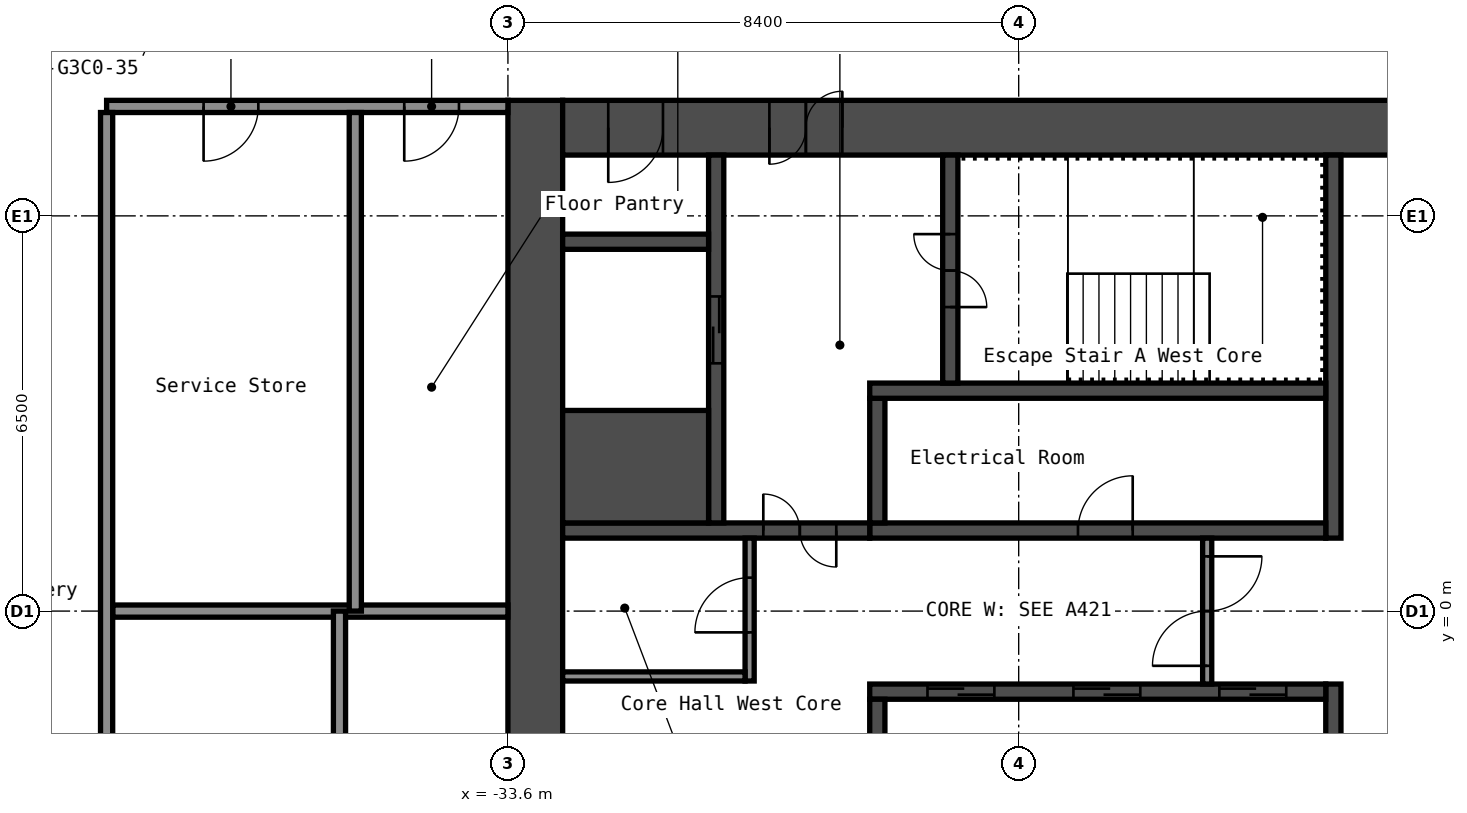
"""IFC4 building model, lengths in metres.
Left out: names, types, materials, properties, quantities, classifications, styles, units other than length and angle.
Written with IfcOpenShell. Run it as: python <this file> out.ifc"""

import sys

from ifc_helpers import new_model, si_unit, direction, frame, frame_2d, origin, place, context, subcontext, project, spatial, rectangle, extrude, element, fill, save


model = new_model("IFC4")
c1 = context("Model", 3, precision=1e-05, world=origin(), true_north=direction((0.0, 1.0)))
c2 = subcontext(c1, "Body", "Model", "MODEL_VIEW")
j1 = project(units=[si_unit("LENGTHUNIT", "METRE"), si_unit("PLANEANGLEUNIT", "RADIAN")], contexts=[c1])
p1 = place(None, origin())
s1 = spatial("IfcSite", under=j1, at=p1, CompositionType="ELEMENT")
p2 = place(p1, origin())
s2 = spatial("IfcBuilding", under=s1, at=p2, CompositionType="ELEMENT")
p3 = place(p2, frame((0.0, 0.0, 137.4)))
s3 = spatial("IfcBuildingStorey", under=s2, at=p3, CompositionType="ELEMENT", Elevation=137.4)
p4 = place(p3, frame((-33.15, -8.4, 0.0), z_axis=(0.0, 0.0, 1.0), x_axis=(0.0, 1.0, 0.0)))
e1 = element("IfcWall", 1, at=p4, inside=s3, PredefinedType="SHEAR", context=c2, shape_type="SweptSolid", body=[
    extrude(rectangle(XDim=16.8, YDim=0.9, at=frame_2d((8.4, 0.0))), origin(), (0.0, 0.0, 1.0), 2.75),
])
p5 = place(p3, frame((-32.7, 7.95, 0.0), z_axis=(0.0, 0.0, 1.0), x_axis=(1.0, 0.0, 0.0)))
e2 = element("IfcWall", 2, at=p5, inside=s3, PredefinedType="SHEAR", context=c2, shape_type="SweptSolid", body=[
    extrude(rectangle(XDim=15.0, YDim=0.9, at=frame_2d((7.5, 0.0))), origin(), (0.0, 0.0, 1.0), 2.75),
])
p6 = place(p5, frame((3.4, 0.0, 0.0)))
e3 = element("IfcOpeningElement", 3, at=p6, cuts=e2, PredefinedType="OPENING", context=c2, shape_type="SweptSolid", body=[
    extrude(rectangle(XDim=1.2, YDim=2.1, at=frame_2d((0.6, 1.05))), frame((0.0, 0.46, 0.0), z_axis=(0.0, -1.0, 0.0), x_axis=(1.0, 0.0, 0.0)), (0.0, 0.0, 1.0), 0.92),
])
p7 = place(p5, frame((0.75, 0.0, 0.0)))
e4 = element("IfcOpeningElement", 4, at=p7, cuts=e2, PredefinedType="OPENING", context=c2, shape_type="SweptSolid", body=[
    extrude(rectangle(XDim=0.9, YDim=2.1, at=frame_2d((0.45, 1.05))), frame((0.0, 0.46, 0.0), z_axis=(0.0, -1.0, 0.0), x_axis=(1.0, 0.0, 0.0)), (0.0, 0.0, 1.0), 0.92),
])
p8 = place(p3, frame((-20.025, 1.2, 0.0), z_axis=(0.0, 0.0, 1.0), x_axis=(0.0, 1.0, 0.0)))
e5 = element("IfcWall", 5, at=p8, inside=s3, PredefinedType="SHEAR", context=c2, shape_type="SweptSolid", body=[
    extrude(rectangle(XDim=6.3, YDim=0.25, at=frame_2d((3.15, 0.0))), origin(), (0.0, 0.0, 1.0), 2.75),
])
p9 = place(p3, frame((-20.025, -7.5, 0.0), z_axis=(0.0, 0.0, 1.0), x_axis=(0.0, 1.0, 0.0)))
e6 = element("IfcWall", 6, at=p9, inside=s3, PredefinedType="SHEAR", context=c2, shape_type="SweptSolid", body=[
    extrude(rectangle(XDim=6.3, YDim=0.25, at=frame_2d((3.15, 0.0))), origin(), (0.0, 0.0, 1.0), 2.75),
])
p10 = place(p9, frame((2.4, 0.0, 0.0)))
e7 = element("IfcOpeningElement", 7, at=p10, cuts=e6, PredefinedType="OPENING", context=c2, shape_type="SweptSolid", body=[
    extrude(rectangle(XDim=1.0, YDim=2.1, at=frame_2d((0.5, 1.05))), frame((0.0, 0.135, 0.0), z_axis=(0.0, -1.0, 0.0), x_axis=(1.0, 0.0, 0.0)), (0.0, 0.0, 1.0), 0.27),
])
p11 = place(p3, frame((-27.65, 1.325, 0.0), z_axis=(0.0, 0.0, 1.0), x_axis=(1.0, 0.0, 0.0)))
e8 = element("IfcWall", 8, at=p11, inside=s3, PredefinedType="SHEAR", context=c2, shape_type="SweptSolid", body=[
    extrude(rectangle(XDim=7.5, YDim=0.25, at=frame_2d((3.75, 0.0))), origin(), (0.0, 0.0, 1.0), 2.75),
])
p12 = place(p11, frame((3.425, 0.0, 0.0)))
e9 = element("IfcOpeningElement", 9, at=p12, cuts=e8, PredefinedType="OPENING", context=c2, shape_type="SweptSolid", body=[
    extrude(rectangle(XDim=0.9, YDim=2.1, at=frame_2d((0.45, 1.05))), frame((0.0, 0.135, 0.0), z_axis=(0.0, -1.0, 0.0), x_axis=(1.0, 0.0, 0.0)), (0.0, 0.0, 1.0), 0.27),
])
p13 = place(p3, frame((-27.525, 1.45, 0.0), z_axis=(0.0, 0.0, 1.0), x_axis=(0.0, 1.0, 0.0)))
e10 = element("IfcWall", 10, at=p13, inside=s3, PredefinedType="SHEAR", context=c2, shape_type="SweptSolid", body=[
    extrude(rectangle(XDim=2.05, YDim=0.25, at=frame_2d((1.025, 0.0))), origin(), (0.0, 0.0, 1.0), 2.75),
])
p14 = place(p3, frame((-27.65, 3.625, 0.0), z_axis=(0.0, 0.0, 1.0), x_axis=(1.0, 0.0, 0.0)))
e11 = element("IfcWall", 11, at=p14, inside=s3, PredefinedType="SHEAR", context=c2, shape_type="SweptSolid", body=[
    extrude(rectangle(XDim=7.5, YDim=0.25, at=frame_2d((3.75, 0.0))), origin(), (0.0, 0.0, 1.0), 2.75),
])
p15 = place(p3, frame((-26.325, 3.75, 0.0), z_axis=(0.0, 0.0, 1.0), x_axis=(0.0, 1.0, 0.0)))
e12 = element("IfcWall", 12, at=p15, inside=s3, PredefinedType="SHEAR", context=c2, shape_type="SweptSolid", body=[
    extrude(rectangle(XDim=3.75, YDim=0.25, at=frame_2d((1.875, 0.0))), origin(), (0.0, 0.0, 1.0), 2.75),
])
p16 = place(p15, frame((1.25, 0.0, 0.0)))
e13 = element("IfcOpeningElement", 13, at=p16, cuts=e12, PredefinedType="OPENING", context=c2, shape_type="SweptSolid", body=[
    extrude(rectangle(XDim=1.2, YDim=2.1, at=frame_2d((0.6, 1.05))), frame((0.0, 0.135, 0.0), z_axis=(0.0, -1.0, 0.0), x_axis=(1.0, 0.0, 0.0)), (0.0, 0.0, 1.0), 0.27),
])
p17 = place(p3, frame((-32.7, 1.325, 0.0), z_axis=(0.0, 0.0, 1.0), x_axis=(1.0, 0.0, 0.0)))
e14 = element("IfcWall", 14, at=p17, inside=s3, PredefinedType="SHEAR", context=c2, shape_type="SweptSolid", body=[
    extrude(rectangle(XDim=5.05, YDim=0.25, at=frame_2d((2.525, 0.0))), origin(), (0.0, 0.0, 1.0), 2.75),
])
p18 = place(p17, frame((3.3, 0.0, 0.0)))
e15 = element("IfcOpeningElement", 15, at=p18, cuts=e14, PredefinedType="OPENING", context=c2, shape_type="SweptSolid", body=[
    extrude(rectangle(XDim=1.2, YDim=2.1, at=frame_2d((0.6, 1.05))), frame((0.0, 0.135, 0.0), z_axis=(0.0, -1.0, 0.0), x_axis=(1.0, 0.0, 0.0)), (0.0, 0.0, 1.0), 0.27),
])
p19 = place(p3, frame((-30.175, 1.45, 0.0), z_axis=(0.0, 0.0, 1.0), x_axis=(0.0, 1.0, 0.0)))
e16 = element("IfcWall", 16, at=p19, inside=s3, PredefinedType="SHEAR", context=c2, shape_type="SweptSolid", body=[
    extrude(rectangle(XDim=6.05, YDim=0.25, at=frame_2d((3.025, 0.0))), origin(), (0.0, 0.0, 1.0), 2.75),
])
p20 = place(p19, frame((2.625, 0.0, 0.0)))
e17 = element("IfcOpeningElement", 17, at=p20, cuts=e16, PredefinedType="OPENING", context=c2, shape_type="SweptSolid", body=[
    extrude(rectangle(XDim=1.1, YDim=2.1, at=frame_2d((0.55, 1.05))), frame((0.0, 0.135, 0.0), z_axis=(0.0, -1.0, 0.0), x_axis=(1.0, 0.0, 0.0)), (0.0, 0.0, 1.0), 0.27),
])
p21 = place(p3, frame((-32.7, 2.375, 0.0), z_axis=(0.0, 0.0, 1.0), x_axis=(1.0, 0.0, 0.0)))
e18 = element("IfcWall", 18, at=p21, inside=s3, PredefinedType="SHEAR", context=c2, shape_type="SweptSolid", body=[
    extrude(rectangle(XDim=2.4, YDim=1.85, at=frame_2d((1.2, 0.0))), origin(), (0.0, 0.0, 1.0), 2.75),
])
p22 = place(p3, frame((-32.7, 6.075, 0.0), z_axis=(0.0, 0.0, 1.0), x_axis=(1.0, 0.0, 0.0)))
e19 = element("IfcWall", 19, at=p22, inside=s3, PredefinedType="SHEAR", context=c2, shape_type="SweptSolid", body=[
    extrude(rectangle(XDim=2.4, YDim=0.25, at=frame_2d((1.2, 0.0))), origin(), (0.0, 0.0, 1.0), 2.75),
])
p23 = place(p3, frame((-27.65, -1.325, 0.0), z_axis=(0.0, 0.0, 1.0), x_axis=(1.0, 0.0, 0.0)))
e20 = element("IfcWall", 20, at=p23, inside=s3, PredefinedType="SHEAR", context=c2, shape_type="SweptSolid", body=[
    extrude(rectangle(XDim=7.5, YDim=0.25, at=frame_2d((3.75, 0.0))), origin(), (0.0, 0.0, 1.0), 2.75),
])
p24 = place(p23, frame((5.75, 0.0, 0.0)))
e21 = element("IfcOpeningElement", 21, at=p24, cuts=e20, PredefinedType="OPENING", context=c2, shape_type="SweptSolid", body=[
    extrude(rectangle(XDim=1.1, YDim=2.1, at=frame_2d((0.55, 1.05))), frame((0.0, 0.135, 0.0), z_axis=(0.0, -1.0, 0.0), x_axis=(1.0, 0.0, 0.0)), (0.0, 0.0, 1.0), 0.27),
])
p25 = place(p23, frame((3.35, 0.0, 0.0)))
e22 = element("IfcOpeningElement", 22, at=p25, cuts=e20, PredefinedType="OPENING", context=c2, shape_type="SweptSolid", body=[
    extrude(rectangle(XDim=1.1, YDim=2.1, at=frame_2d((0.55, 1.05))), frame((0.0, 0.135, 0.0), z_axis=(0.0, -1.0, 0.0), x_axis=(1.0, 0.0, 0.0)), (0.0, 0.0, 1.0), 0.27),
])
p26 = place(p23, frame((0.95, 0.0, 0.0)))
e23 = element("IfcOpeningElement", 23, at=p26, cuts=e20, PredefinedType="OPENING", context=c2, shape_type="SweptSolid", body=[
    extrude(rectangle(XDim=1.1, YDim=2.1, at=frame_2d((0.55, 1.05))), frame((0.0, 0.135, 0.0), z_axis=(0.0, -1.0, 0.0), x_axis=(1.0, 0.0, 0.0)), (0.0, 0.0, 1.0), 0.27),
])
p27 = place(p3, frame((-27.525, -3.5, 0.0), z_axis=(0.0, 0.0, 1.0), x_axis=(0.0, 1.0, 0.0)))
e24 = element("IfcWall", 24, at=p27, inside=s3, PredefinedType="SHEAR", context=c2, shape_type="SweptSolid", body=[
    extrude(rectangle(XDim=2.05, YDim=0.25, at=frame_2d((1.025, 0.0))), origin(), (0.0, 0.0, 1.0), 2.75),
])
p28 = place(p3, frame((-22.1, -1.2, 0.0), z_axis=(0.0, 0.0, 1.0), x_axis=(0.0, 1.0, 0.0)))
e25 = element("IfcWall", 25, at=p28, inside=s3, PredefinedType="PARTITIONING", context=c2, shape_type="SweptSolid", body=[
    extrude(rectangle(XDim=2.4, YDim=0.15, at=frame_2d((1.2, 0.0))), origin(), (0.0, 0.0, 1.0), 2.75),
])
p29 = place(p28, frame((0.3, 0.0, 0.0)))
e26 = element("IfcOpeningElement", 26, at=p29, cuts=e25, PredefinedType="OPENING", context=c2, shape_type="SweptSolid", body=[
    extrude(rectangle(XDim=1.8, YDim=2.1, at=frame_2d((0.9, 1.05))), frame((0.0, 0.085, 0.0), z_axis=(0.0, -1.0, 0.0), x_axis=(1.0, 0.0, 0.0)), (0.0, 0.0, 1.0), 0.17),
])
p30 = place(p3, frame((-29.625, -1.15, 0.0), z_axis=(0.0, 0.0, 1.0), x_axis=(0.0, 1.0, 0.0)))
e27 = element("IfcWall", 27, at=p30, inside=s3, PredefinedType="PARTITIONING", context=c2, shape_type="SweptSolid", body=[
    extrude(rectangle(XDim=2.35, YDim=0.15, at=frame_2d((1.175, 0.0))), origin(), (0.0, 0.0, 1.0), 2.75),
])
p31 = place(p30, frame((0.8, 0.0, 0.0)))
e28 = element("IfcOpeningElement", 28, at=p31, cuts=e27, PredefinedType="OPENING", context=c2, shape_type="SweptSolid", body=[
    extrude(rectangle(XDim=0.9, YDim=2.1, at=frame_2d((0.45, 1.05))), frame((0.0, 0.085, 0.0), z_axis=(0.0, -1.0, 0.0), x_axis=(1.0, 0.0, 0.0)), (0.0, 0.0, 1.0), 0.17),
])
p32 = place(p3, frame((-32.7, -1.075, 0.0), z_axis=(0.0, 0.0, 1.0), x_axis=(1.0, 0.0, 0.0)))
e29 = element("IfcWall", 29, at=p32, inside=s3, PredefinedType="PARTITIONING", context=c2, shape_type="SweptSolid", body=[
    extrude(rectangle(XDim=3.0, YDim=0.15, at=frame_2d((1.5, 0.0))), origin(), (0.0, 0.0, 1.0), 2.75),
])
p33 = place(p3, frame((-40.1, 0.0, 0.0), z_axis=(0.0, 0.0, 1.0), x_axis=(1.0, 0.0, 0.0)))
e30 = element("IfcWall", 30, at=p33, inside=s3, PredefinedType="PARTITIONING", context=c2, shape_type="SweptSolid", body=[
    extrude(rectangle(XDim=6.5, YDim=0.2, at=frame_2d((3.25, 0.0))), origin(), (0.0, 0.0, 1.0), 2.75),
])
p34 = place(p3, frame((-40.2, 8.3, 0.0), z_axis=(0.0, 0.0, 1.0), x_axis=(1.0, 0.0, 0.0)))
e31 = element("IfcWall", 31, at=p34, inside=s3, PredefinedType="PARTITIONING", context=c2, shape_type="SweptSolid", body=[
    extrude(rectangle(XDim=6.6, YDim=0.2, at=frame_2d((3.3, 0.0))), origin(), (0.0, 0.0, 1.0), 2.75),
])
p35 = place(p34, frame((1.595, 0.0, 0.0)))
e32 = element("IfcOpeningElement", 32, at=p35, cuts=e31, PredefinedType="OPENING", context=c2, shape_type="SweptSolid", body=[
    extrude(rectangle(XDim=0.9, YDim=2.1, at=frame_2d((0.45, 1.05))), frame((0.0, 0.11, 0.0), z_axis=(0.0, -1.0, 0.0), x_axis=(1.0, 0.0, 0.0)), (0.0, 0.0, 1.0), 0.22),
])
p36 = place(p34, frame((4.895, 0.0, 0.0)))
e33 = element("IfcOpeningElement", 33, at=p36, cuts=e31, PredefinedType="OPENING", context=c2, shape_type="SweptSolid", body=[
    extrude(rectangle(XDim=0.9, YDim=2.1, at=frame_2d((0.45, 1.05))), frame((0.0, 0.11, 0.0), z_axis=(0.0, -1.0, 0.0), x_axis=(1.0, 0.0, 0.0)), (0.0, 0.0, 1.0), 0.22),
])
p37 = place(p3, frame((-40.2, -8.2, 0.0), z_axis=(0.0, 0.0, 1.0), x_axis=(0.0, 1.0, 0.0)))
e34 = element("IfcWall", 34, at=p37, inside=s3, PredefinedType="PARTITIONING", context=c2, shape_type="SweptSolid", body=[
    extrude(rectangle(XDim=16.4, YDim=0.2, at=frame_2d((8.2, 0.0))), origin(), (0.0, 0.0, 1.0), 2.75),
])
for number, where, z_axis, x_axis in (
    (35, (-36.37, -8.2, 0.0), (0.0, 0.0, 1.0), (0.0, 1.0, 0.0)),
    (36, (-36.11, 0.0, 0.0), (0.0, 0.0, 1.0), (0.0, 1.0, 0.0)),
):
    element("IfcWall", number, at=place(p3, frame(where, z_axis=z_axis, x_axis=x_axis)), inside=s3, PredefinedType="PARTITIONING", context=c2, shape_type="SweptSolid", body=[
        extrude(rectangle(XDim=8.2, YDim=0.2, at=frame_2d((4.1, 0.0))), origin(), (0.0, 0.0, 1.0), 2.75),
    ])
p38 = place(p6, origin())
e37 = element("IfcDoor", 37, at=p38, inside=s3, OperationType="DOUBLE_DOOR_SINGLE_SWING", PredefinedType="DOOR", context=c2, shape_type="SweptSolid", body=[
    extrude(rectangle(XDim=1.2, YDim=2.1, at=frame_2d((0.6, 1.05))), frame((0.0, 0.025, 0.0), z_axis=(0.0, -1.0, 0.0), x_axis=(1.0, 0.0, 0.0)), (0.0, 0.0, 1.0), 0.05),
])
fill(e3, e37)
p39 = place(p7, origin())
e38 = element("IfcDoor", 38, at=p39, inside=s3, OperationType="SINGLE_SWING_LEFT", PredefinedType="DOOR", context=c2, shape_type="SweptSolid", body=[
    extrude(rectangle(XDim=0.9, YDim=2.1, at=frame_2d((0.45, 1.05))), frame((0.0, 0.025, 0.0), z_axis=(0.0, -1.0, 0.0), x_axis=(1.0, 0.0, 0.0)), (0.0, 0.0, 1.0), 0.05),
])
fill(e4, e38)
p40 = place(p16, origin())
e39 = element("IfcDoor", 39, at=p40, inside=s3, OperationType="DOUBLE_DOOR_SINGLE_SWING", PredefinedType="DOOR", context=c2, shape_type="SweptSolid", body=[
    extrude(rectangle(XDim=1.2, YDim=2.1, at=frame_2d((0.6, 1.05))), frame((0.0, 0.025, 0.0), z_axis=(0.0, -1.0, 0.0), x_axis=(1.0, 0.0, 0.0)), (0.0, 0.0, 1.0), 0.05),
])
fill(e13, e39)
p41 = place(p18, origin())
e40 = element("IfcDoor", 40, at=p41, inside=s3, OperationType="DOUBLE_DOOR_SINGLE_SWING", PredefinedType="DOOR", context=c2, shape_type="SweptSolid", body=[
    extrude(rectangle(XDim=1.2, YDim=2.1, at=frame_2d((0.6, 1.05))), frame((0.0, 0.025, 0.0), z_axis=(0.0, -1.0, 0.0), x_axis=(1.0, 0.0, 0.0)), (0.0, 0.0, 1.0), 0.05),
])
fill(e15, e40)
p42 = place(p29, origin())
e41 = element("IfcDoor", 41, at=p42, inside=s3, OperationType="DOUBLE_DOOR_SINGLE_SWING", PredefinedType="DOOR", context=c2, shape_type="SweptSolid", body=[
    extrude(rectangle(XDim=1.8, YDim=2.1, at=frame_2d((0.9, 1.05))), frame((0.0, 0.025, 0.0), z_axis=(0.0, -1.0, 0.0), x_axis=(1.0, 0.0, 0.0)), (0.0, 0.0, 1.0), 0.05),
])
fill(e26, e41)
p43 = place(p31, origin())
e42 = element("IfcDoor", 42, at=p43, inside=s3, OperationType="SINGLE_SWING_RIGHT", PredefinedType="DOOR", context=c2, shape_type="SweptSolid", body=[
    extrude(rectangle(XDim=0.9, YDim=2.1, at=frame_2d((0.45, 1.05))), frame((0.0, 0.025, 0.0), z_axis=(0.0, -1.0, 0.0), x_axis=(1.0, 0.0, 0.0)), (0.0, 0.0, 1.0), 0.05),
])
fill(e28, e42)
p44 = place(p12, origin())
e43 = element("IfcDoor", 43, at=p44, inside=s3, OperationType="SINGLE_SWING_LEFT", PredefinedType="DOOR", context=c2, shape_type="SweptSolid", body=[
    extrude(rectangle(XDim=0.9, YDim=2.1, at=frame_2d((0.45, 1.05))), frame((0.0, 0.025, 0.0), z_axis=(0.0, -1.0, 0.0), x_axis=(1.0, 0.0, 0.0)), (0.0, 0.0, 1.0), 0.05),
])
fill(e9, e43)
p45 = place(p24, origin())
e44 = element("IfcDoor", 44, at=p45, inside=s3, OperationType="DOUBLE_DOOR_SLIDING", PredefinedType="DOOR", context=c2, shape_type="SweptSolid", body=[
    extrude(rectangle(XDim=1.1, YDim=2.1, at=frame_2d((0.55, 1.05))), frame((0.0, 0.025, 0.0), z_axis=(0.0, -1.0, 0.0), x_axis=(1.0, 0.0, 0.0)), (0.0, 0.0, 1.0), 0.05),
])
fill(e21, e44)
p46 = place(p25, origin())
e45 = element("IfcDoor", 45, at=p46, inside=s3, OperationType="DOUBLE_DOOR_SLIDING", PredefinedType="DOOR", context=c2, shape_type="SweptSolid", body=[
    extrude(rectangle(XDim=1.1, YDim=2.1, at=frame_2d((0.55, 1.05))), frame((0.0, 0.025, 0.0), z_axis=(0.0, -1.0, 0.0), x_axis=(1.0, 0.0, 0.0)), (0.0, 0.0, 1.0), 0.05),
])
fill(e22, e45)
p47 = place(p26, origin())
e46 = element("IfcDoor", 46, at=p47, inside=s3, OperationType="DOUBLE_DOOR_SLIDING", PredefinedType="DOOR", context=c2, shape_type="SweptSolid", body=[
    extrude(rectangle(XDim=1.1, YDim=2.1, at=frame_2d((0.55, 1.05))), frame((0.0, 0.025, 0.0), z_axis=(0.0, -1.0, 0.0), x_axis=(1.0, 0.0, 0.0)), (0.0, 0.0, 1.0), 0.05),
])
fill(e23, e46)
p48 = place(p20, origin())
e47 = element("IfcDoor", 47, at=p48, inside=s3, OperationType="DOUBLE_DOOR_SLIDING", PredefinedType="DOOR", context=c2, shape_type="SweptSolid", body=[
    extrude(rectangle(XDim=1.1, YDim=2.1, at=frame_2d((0.55, 1.05))), frame((0.0, 0.025, 0.0), z_axis=(0.0, -1.0, 0.0), x_axis=(1.0, 0.0, 0.0)), (0.0, 0.0, 1.0), 0.05),
])
fill(e17, e47)
p49 = place(p35, origin())
e48 = element("IfcDoor", 48, at=p49, inside=s3, OperationType="SINGLE_SWING_LEFT", PredefinedType="DOOR", context=c2, shape_type="SweptSolid", body=[
    extrude(rectangle(XDim=0.9, YDim=2.1, at=frame_2d((0.45, 1.05))), frame((0.0, 0.025, 0.0), z_axis=(0.0, -1.0, 0.0), x_axis=(1.0, 0.0, 0.0)), (0.0, 0.0, 1.0), 0.05),
])
fill(e32, e48)
p50 = place(p36, origin())
e49 = element("IfcDoor", 49, at=p50, inside=s3, OperationType="SINGLE_SWING_LEFT", PredefinedType="DOOR", context=c2, shape_type="SweptSolid", body=[
    extrude(rectangle(XDim=0.9, YDim=2.1, at=frame_2d((0.45, 1.05))), frame((0.0, 0.025, 0.0), z_axis=(0.0, -1.0, 0.0), x_axis=(1.0, 0.0, 0.0)), (0.0, 0.0, 1.0), 0.05),
])
fill(e33, e49)
save(model, sys.argv[1])
